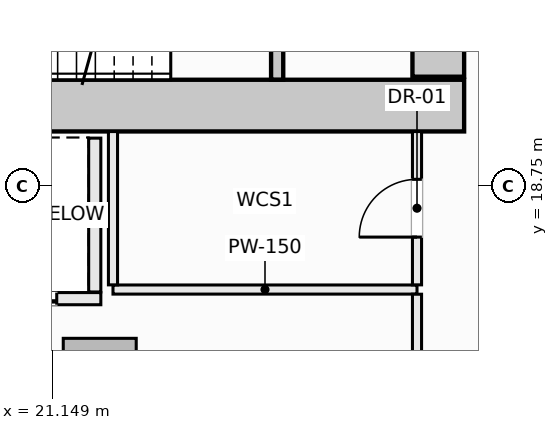
"""IFC4 building model, lengths in metres.
Left out: names, types, materials, properties, quantities, classifications, styles, units other than length and angle.
Written with IfcOpenShell. Run it as: python <this file> out.ifc"""

import sys

from ifc_helpers import new_model, si_unit, direction, frame, frame_2d, origin, origin_2d, place, context, subcontext, project, spatial, rectangle, extrude, element, fill, save


model = new_model("IFC4")
c1 = context("Model", 3, precision=1e-05, world=origin(), true_north=direction((0.0, 1.0)))
c2 = subcontext(c1, "Body", "Model", "MODEL_VIEW")
j1 = project(units=[si_unit("LENGTHUNIT", "METRE"), si_unit("PLANEANGLEUNIT", "RADIAN")], contexts=[c1])
p1 = place(None, origin())
s1 = spatial("IfcSite", under=j1, at=p1, CompositionType="ELEMENT")
p2 = place(p1, origin())
s2 = spatial("IfcBuilding", under=s1, at=p2, CompositionType="ELEMENT")
p3 = place(p2, frame((0.0, 0.0, 76.55)))
s3 = spatial("IfcBuildingStorey", under=s2, at=p3, CompositionType="ELEMENT", Elevation=76.55)
p4 = place(p3, frame((14.075, 20.075, -0.28), z_axis=(0.0, 0.0, 1.0), x_axis=(1.0, 0.0, 0.0)))
e1 = element("IfcWall", 1, at=p4, inside=s3, PredefinedType="SHEAR", context=c2, shape_type="SweptSolid", body=[
    extrude(rectangle(XDim=13.85, YDim=0.85, at=frame_2d((6.925, 0.0))), origin(), (0.0, 0.0, 1.0), 3.85),
])
p5 = place(p3, frame((27.5, 20.55, -0.28), z_axis=(0.0, 0.0, 1.0), x_axis=(0.0, 1.0, 0.0)))
e2 = element("IfcWall", 2, at=p5, inside=s3, PredefinedType="SHEAR", context=c2, shape_type="SweptSolid", body=[
    extrude(rectangle(XDim=1.5, YDim=0.85, at=frame_2d((0.75, 0.0))), origin(), (0.0, 0.0, 1.0), 3.85),
])
p6 = place(p3, frame((21.932, 15.648, -0.28), z_axis=(0.0, 0.0, 1.0), x_axis=(1.0, 0.0, 0.0)))
e3 = element("IfcColumn", 3, at=p6, inside=s3, PredefinedType="COLUMN", context=c2, shape_type="SweptSolid", body=[
    extrude(rectangle(XDim=1.2, YDim=1.2, at=origin_2d()), origin(), (0.0, 0.0, 1.0), 3.85),
])
p7 = place(p3, frame((24.85, 20.502, -0.28), z_axis=(0.0, 0.0, 1.0), x_axis=(0.0, 1.0, 0.0)))
e4 = element("IfcWall", 4, at=p7, inside=s3, PredefinedType="SHEAR", context=c2, shape_type="SweptSolid", body=[
    extrude(rectangle(XDim=3.038, YDim=0.2, at=frame_2d((1.519, 0.0))), origin(), (0.0, 0.0, 1.0), 3.85),
])
p8 = place(p7, frame((0.969, 0.0, 0.28)))
e5 = element("IfcOpeningElement", 5, at=p8, cuts=e4, PredefinedType="OPENING", context=c2, shape_type="SweptSolid", body=[
    extrude(rectangle(XDim=1.1, YDim=2.15, at=frame_2d((0.55, 1.075))), frame((0.0, 0.11, 0.0), z_axis=(0.0, -1.0, 0.0), x_axis=(1.0, 0.0, 0.0)), (0.0, 0.0, 1.0), 0.22),
])
p9 = place(p3, frame((19.4, 16.9, 0.0), z_axis=(0.0, 0.0, 1.0), x_axis=(1.0, 0.0, 0.0)))
e6 = element("IfcWall", 6, at=p9, inside=s3, PredefinedType="SOLIDWALL", context=c2, shape_type="SweptSolid", body=[
    extrude(rectangle(XDim=2.55, YDim=0.2, at=frame_2d((1.275, 0.0))), origin(), (0.0, 0.0, 1.0), 3.57),
])
p10 = place(p9, frame((0.725, 0.0, 0.0)))
e7 = element("IfcOpeningElement", 7, at=p10, cuts=e6, PredefinedType="OPENING", context=c2, shape_type="SweptSolid", body=[
    extrude(rectangle(XDim=1.1, YDim=2.2, at=frame_2d((0.55, 1.1))), frame((0.0, 0.11, 0.0), z_axis=(0.0, -1.0, 0.0), x_axis=(1.0, 0.0, 0.0)), (0.0, 0.0, 1.0), 0.22),
])
p11 = place(p3, frame((21.85, 17.01, 0.0), z_axis=(0.0, 0.0, 1.0), x_axis=(0.0, 1.0, 0.0)))
e8 = element("IfcWall", 8, at=p11, inside=s3, PredefinedType="SOLIDWALL", context=c2, shape_type="SweptSolid", body=[
    extrude(rectangle(XDim=2.53, YDim=0.2, at=frame_2d((1.265, 0.0))), origin(), (0.0, 0.0, 1.0), 3.57),
])
p12 = place(p3, frame((22.15, 17.05, 0.0), z_axis=(0.0, 0.0, 1.0), x_axis=(1.0, 0.0, 0.0)))
e9 = element("IfcWall", 9, at=p12, inside=s3, PredefinedType="PARTITIONING", context=c2, shape_type="SweptSolid", body=[
    extrude(rectangle(XDim=5.0, YDim=0.15, at=frame_2d((2.5, 0.0))), origin(), (0.0, 0.0, 1.0), 3.57),
])
p13 = place(p3, frame((22.15, 17.127, 0.0), z_axis=(0.0, 0.0, 1.0), x_axis=(0.0, 1.0, 0.0)))
e10 = element("IfcWall", 10, at=p13, inside=s3, PredefinedType="PARTITIONING", context=c2, shape_type="SweptSolid", body=[
    extrude(rectangle(XDim=2.521, YDim=0.15, at=frame_2d((1.26, 0.0))), origin(), (0.0, 0.0, 1.0), 3.57),
])
p14 = place(p3, frame((27.15, 13.85, 0.0), z_axis=(0.0, 0.0, 1.0), x_axis=(0.0, 1.0, 0.0)))
e11 = element("IfcWall", 11, at=p14, inside=s3, PredefinedType="PARTITIONING", context=c2, shape_type="SweptSolid", body=[
    extrude(rectangle(XDim=3.123, YDim=0.15, at=frame_2d((1.562, 0.0))), origin(), (0.0, 0.0, 1.0), 3.57),
])
p15 = place(p14, frame((1.218, 0.0, 0.0)))
e12 = element("IfcOpeningElement", 12, at=p15, cuts=e11, PredefinedType="OPENING", context=c2, shape_type="SweptSolid", body=[
    extrude(rectangle(XDim=0.95, YDim=2.1, at=frame_2d((0.475, 1.05))), frame((0.0, 0.085, 0.0), z_axis=(0.0, -1.0, 0.0), x_axis=(1.0, 0.0, 0.0)), (0.0, 0.0, 1.0), 0.17),
])
p16 = place(p3, frame((27.15, 17.127, 0.0), z_axis=(0.0, 0.0, 1.0), x_axis=(0.0, 1.0, 0.0)))
e13 = element("IfcWall", 13, at=p16, inside=s3, PredefinedType="PARTITIONING", context=c2, shape_type="SweptSolid", body=[
    extrude(rectangle(XDim=2.521, YDim=0.15, at=frame_2d((1.26, 0.0))), origin(), (0.0, 0.0, 1.0), 3.57),
])
p17 = place(p16, frame((0.785, 0.0, 0.0)))
e14 = element("IfcOpeningElement", 14, at=p17, cuts=e13, PredefinedType="OPENING", context=c2, shape_type="SweptSolid", body=[
    extrude(rectangle(XDim=0.95, YDim=2.1, at=frame_2d((0.475, 1.05))), frame((0.0, 0.085, 0.0), z_axis=(0.0, -1.0, 0.0), x_axis=(1.0, 0.0, 0.0)), (0.0, 0.0, 1.0), 0.17),
])
p18 = place(p3, frame((7.089, 17.026, 0.0), z_axis=(0.0, 0.0, 1.0), x_axis=(0.992316064114, -0.123728852337, 0.0)))
e15 = element("IfcWall", 15, at=p18, inside=s3, PredefinedType="PARTITIONING", context=c2, shape_type="SweptSolid", body=[
    extrude(rectangle(XDim=20.138, YDim=0.12, at=frame_2d((10.069, 0.0))), origin(), (0.0, 0.0, 1.0), 3.205),
])
p19 = place(p10, origin())
e16 = element("IfcDoor", 16, at=p19, inside=s3, OperationType="SLIDING_TO_LEFT", PredefinedType="DOOR", context=c2, shape_type="SweptSolid", body=[
    extrude(rectangle(XDim=1.1, YDim=2.2, at=frame_2d((0.55, 1.1))), frame((0.0, 0.025, 0.0), z_axis=(0.0, -1.0, 0.0), x_axis=(1.0, 0.0, 0.0)), (0.0, 0.0, 1.0), 0.05),
])
fill(e7, e16)
p20 = place(p17, origin())
e17 = element("IfcDoor", 17, at=p20, inside=s3, OperationType="SINGLE_SWING_LEFT", PredefinedType="DOOR", context=c2, shape_type="SweptSolid", body=[
    extrude(rectangle(XDim=0.95, YDim=2.1, at=frame_2d((0.475, 1.05))), frame((0.0, 0.025, 0.0), z_axis=(0.0, -1.0, 0.0), x_axis=(1.0, 0.0, 0.0)), (0.0, 0.0, 1.0), 0.05),
])
fill(e14, e17)
save(model, sys.argv[1])
